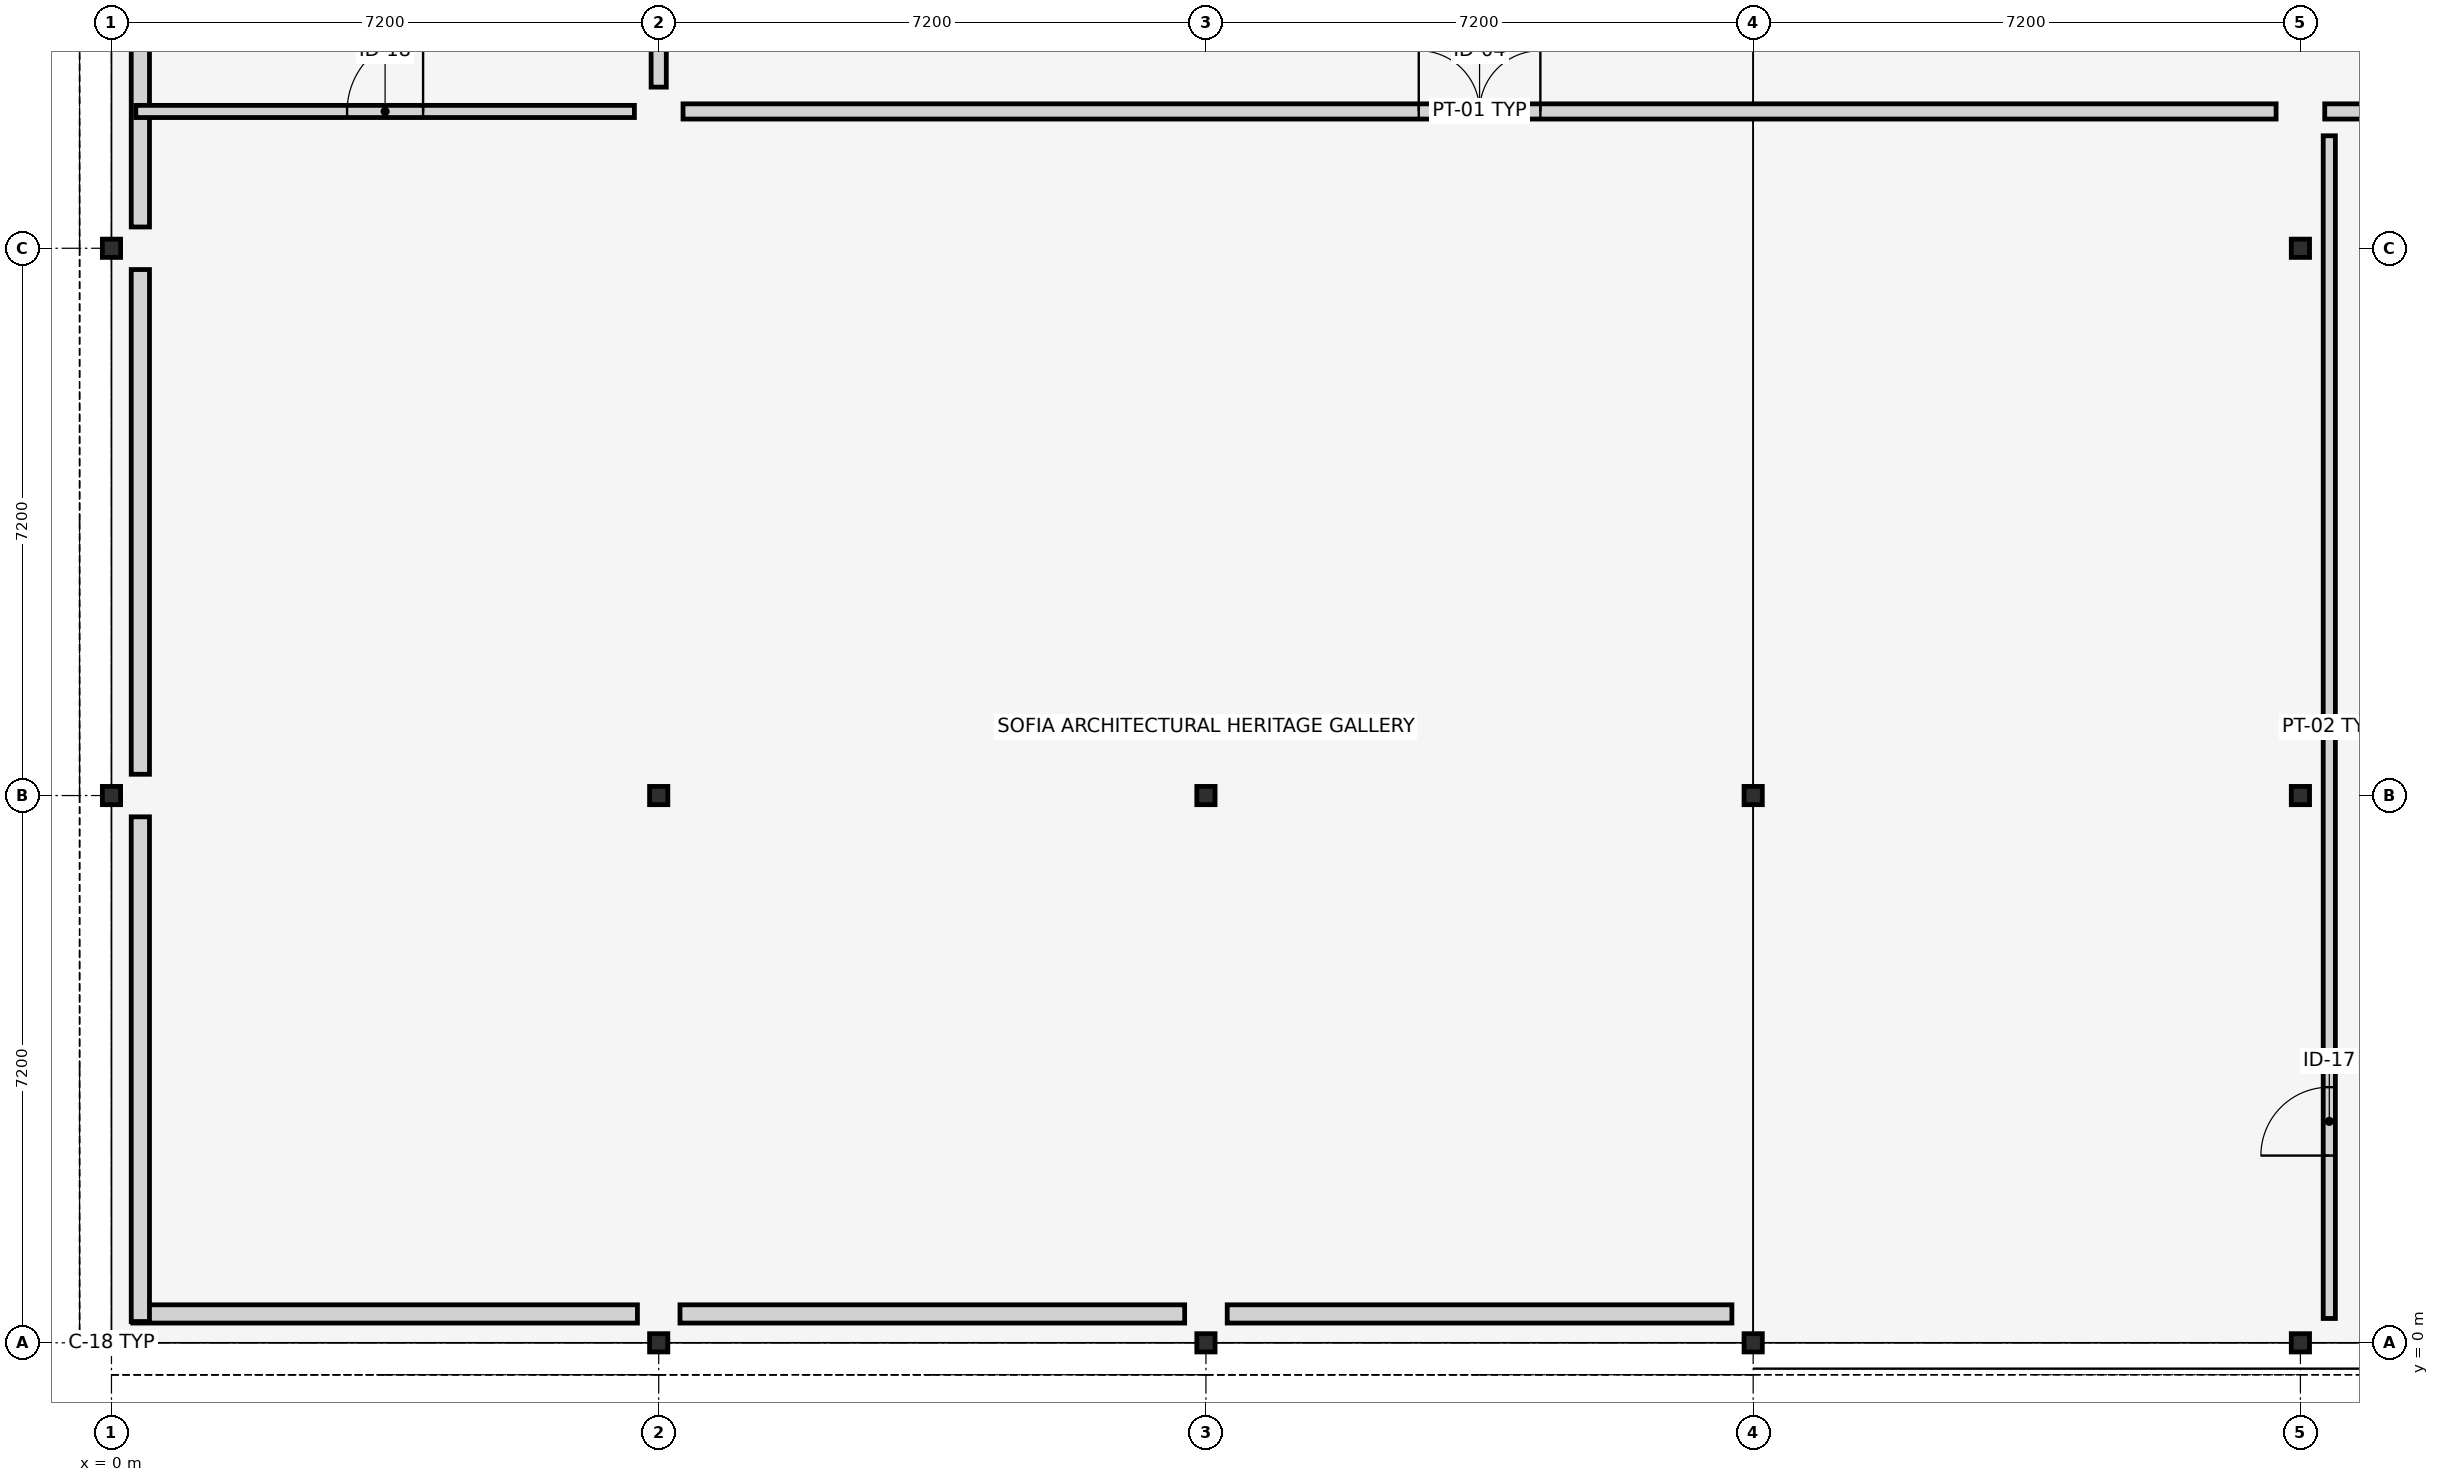
"""IFC4 building model, lengths in metres.
Left out: names, types, materials, properties, quantities, classifications, styles, units other than length and angle.
Written with IfcOpenShell. Run it as: python <this file> out.ifc"""

import sys

from ifc_helpers import new_model, si_unit, direction, frame, frame_2d, origin, origin_2d, place, context, subcontext, project, spatial, rectangle, i_section, extrude, element, fill, save


model = new_model("IFC4")
c1 = context("Model", 3, precision=1e-05, world=origin(), true_north=direction((0.0, 1.0)))
c2 = subcontext(c1, "Body", "Model", "MODEL_VIEW")
j1 = project(units=[si_unit("LENGTHUNIT", "METRE"), si_unit("PLANEANGLEUNIT", "RADIAN")], contexts=[c1])
p1 = place(None, origin())
s1 = spatial("IfcSite", under=j1, at=p1, CompositionType="ELEMENT")
p2 = place(p1, origin())
s2 = spatial("IfcBuilding", under=s1, at=p2, CompositionType="ELEMENT")
p3 = place(p2, frame((0.0, 0.0, 8.7)))
s3 = spatial("IfcBuildingStorey", under=s2, at=p3, CompositionType="ELEMENT", Elevation=8.7)
for number, where, z_axis, x_axis in (
    (1, (0.0, 0.0, 0.0), (0.0, 0.0, 1.0), (1.0, 0.0, 0.0)),
    (2, (0.0, 7.2, 0.0), (0.0, 0.0, 1.0), (0.0, 1.0, 0.0)),
    (3, (0.0, 14.4, 0.0), (0.0, 0.0, 1.0), (1.0, 0.0, 0.0)),
    (4, (7.2, 0.0, 0.0), (0.0, 0.0, 1.0), (0.0, 1.0, 0.0)),
    (5, (7.2, 7.2, 0.0), (0.0, 0.0, 1.0), (1.0, 0.0, 0.0)),
    (6, (14.4, 0.0, 0.0), (0.0, 0.0, 1.0), (1.0, 0.0, 0.0)),
    (7, (14.4, 7.2, 0.0), (0.0, 0.0, 1.0), (0.0, 1.0, 0.0)),
    (8, (21.6, 0.0, 0.0), (0.0, 0.0, 1.0), (0.0, 1.0, 0.0)),
    (9, (21.6, 7.2, 0.0), (0.0, 0.0, 1.0), (1.0, 0.0, 0.0)),
    (10, (28.8, 0.0, 0.0), (0.0, 0.0, 1.0), (1.0, 0.0, 0.0)),
    (11, (28.8, 7.2, 0.0), (0.0, 0.0, 1.0), (0.0, 1.0, 0.0)),
    (12, (28.8, 14.4, 0.0), (0.0, 0.0, 1.0), (1.0, 0.0, 0.0)),
):
    element("IfcColumn", number, at=place(p3, frame(where, z_axis=z_axis, x_axis=x_axis)), inside=s3, PredefinedType="COLUMN", context=c2, shape_type="SweptSolid", body=[
        extrude(i_section(OverallWidth=0.24, OverallDepth=0.24, WebThickness=0.01, FlangeThickness=0.017, FilletRadius=0.021, at=origin_2d()), origin(), (0.0, 0.0, 1.0), 4.2),
    ])
p4 = place(p3, frame((0.28, 0.38, 0.0), z_axis=(0.0, 0.0, 1.0), x_axis=(1.0, 0.0, 0.0)))
e13 = element("IfcWall", 13, at=p4, inside=s3, PredefinedType="STANDARD", context=c2, shape_type="SweptSolid", body=[
    extrude(rectangle(XDim=6.64, YDim=0.24, at=frame_2d((3.32, 0.0))), origin(), (0.0, 0.0, 1.0), 3.58),
])
for number, where, z_axis, x_axis in (
    (14, (7.48, 0.38, 0.0), (0.0, 0.0, 1.0), (1.0, 0.0, 0.0)),
    (15, (14.68, 0.38, 0.0), (0.0, 0.0, 1.0), (1.0, 0.0, 0.0)),
    (16, (0.38, 21.32, 0.0), (0.0, 0.0, 1.0), (0.0, -1.0, 0.0)),
    (17, (0.38, 14.12, 0.0), (0.0, 0.0, 1.0), (0.0, -1.0, 0.0)),
):
    element("IfcWall", number, at=place(p3, frame(where, z_axis=z_axis, x_axis=x_axis)), inside=s3, PredefinedType="STANDARD", context=c2, shape_type="SweptSolid", body=[
        extrude(rectangle(XDim=6.64, YDim=0.24, at=frame_2d((3.32, 0.0))), origin(), (0.0, 0.0, 1.0), 3.58),
    ])
p5 = place(p3, frame((0.38, 6.92, 0.0), z_axis=(0.0, 0.0, 1.0), x_axis=(0.0, -1.0, 0.0)))
e18 = element("IfcWall", 18, at=p5, inside=s3, PredefinedType="STANDARD", context=c2, shape_type="SweptSolid", body=[
    extrude(rectangle(XDim=6.64, YDim=0.24, at=frame_2d((3.32, 0.0))), origin(), (0.0, 0.0, 1.0), 3.58),
])
p6 = place(p3, frame((7.52, 16.2, 0.0), z_axis=(0.0, 0.0, 1.0), x_axis=(1.0, 0.0, 0.0)))
e19 = element("IfcWall", 19, at=p6, inside=s3, PredefinedType="PARTITIONING", context=c2, shape_type="SweptSolid", body=[
    extrude(rectangle(XDim=20.96, YDim=0.2, at=frame_2d((10.48, 0.0))), origin(), (0.0, 0.0, 1.0), 3.15),
])
p7 = place(p6, frame((9.68, 0.0, 0.0)))
e20 = element("IfcOpeningElement", 20, at=p7, cuts=e19, PredefinedType="OPENING", context=c2, shape_type="SweptSolid", body=[
    extrude(rectangle(XDim=1.6, YDim=2.35, at=frame_2d((0.8, 1.175))), frame((0.0, 0.11, 0.0), z_axis=(0.0, -1.0, 0.0), x_axis=(1.0, 0.0, 0.0)), (0.0, 0.0, 1.0), 0.22),
])
p8 = place(p3, frame((29.12, 16.2, 0.0), z_axis=(0.0, 0.0, 1.0), x_axis=(1.0, 0.0, 0.0)))
e21 = element("IfcWall", 21, at=p8, inside=s3, PredefinedType="PARTITIONING", context=c2, shape_type="SweptSolid", body=[
    extrude(rectangle(XDim=6.56, YDim=0.2, at=frame_2d((3.28, 0.0))), origin(), (0.0, 0.0, 1.0), 3.15),
])
p9 = place(p8, frame((2.48, 0.0, 0.0)))
e22 = element("IfcOpeningElement", 22, at=p9, cuts=e21, PredefinedType="OPENING", context=c2, shape_type="SweptSolid", body=[
    extrude(rectangle(XDim=1.6, YDim=2.35, at=frame_2d((0.8, 1.175))), frame((0.0, 0.11, 0.0), z_axis=(0.0, -1.0, 0.0), x_axis=(1.0, 0.0, 0.0)), (0.0, 0.0, 1.0), 0.22),
])
p10 = place(p3, frame((7.2, 16.52, 0.0), z_axis=(0.0, 0.0, 1.0), x_axis=(0.0, 1.0, 0.0)))
e23 = element("IfcWall", 23, at=p10, inside=s3, PredefinedType="PARTITIONING", context=c2, shape_type="SweptSolid", body=[
    extrude(rectangle(XDim=2.96, YDim=0.2, at=frame_2d((1.48, 0.0))), origin(), (0.0, 0.0, 1.0), 3.15),
])
p11 = place(p10, frame((0.98, 0.0, 0.0)))
e24 = element("IfcOpeningElement", 24, at=p11, cuts=e23, PredefinedType="OPENING", context=c2, shape_type="SweptSolid", body=[
    extrude(rectangle(XDim=1.0, YDim=2.15, at=frame_2d((0.5, 1.075))), frame((0.0, 0.11, 0.0), z_axis=(0.0, -1.0, 0.0), x_axis=(1.0, 0.0, 0.0)), (0.0, 0.0, 1.0), 0.22),
])
p12 = place(p3, frame((29.18, 0.32, 0.0), z_axis=(0.0, 0.0, 1.0), x_axis=(0.0, 1.0, 0.0)))
e25 = element("IfcWall", 25, at=p12, inside=s3, PredefinedType="PARTITIONING", context=c2, shape_type="SweptSolid", body=[
    extrude(rectangle(XDim=15.56, YDim=0.16, at=frame_2d((7.78, 0.0))), origin(), (0.0, 0.0, 1.0), 3.15),
])
p13 = place(p12, frame((2.143, 0.0, 0.0)))
e26 = element("IfcOpeningElement", 26, at=p13, cuts=e25, PredefinedType="OPENING", context=c2, shape_type="SweptSolid", body=[
    extrude(rectangle(XDim=0.9, YDim=2.1, at=frame_2d((0.45, 1.05))), frame((0.0, 0.09, 0.0), z_axis=(0.0, -1.0, 0.0), x_axis=(1.0, 0.0, 0.0)), (0.0, 0.0, 1.0), 0.18),
])
p14 = place(p3, frame((0.32, 16.2, 0.0), z_axis=(0.0, 0.0, 1.0), x_axis=(1.0, 0.0, 0.0)))
e27 = element("IfcWall", 27, at=p14, inside=s3, PredefinedType="PARTITIONING", context=c2, shape_type="SweptSolid", body=[
    extrude(rectangle(XDim=6.56, YDim=0.16, at=frame_2d((3.28, 0.0))), origin(), (0.0, 0.0, 1.0), 3.15),
])
p15 = place(p14, frame((2.78, 0.0, 0.0)))
e28 = element("IfcOpeningElement", 28, at=p15, cuts=e27, PredefinedType="OPENING", context=c2, shape_type="SweptSolid", body=[
    extrude(rectangle(XDim=1.0, YDim=2.25, at=frame_2d((0.5, 1.125))), frame((0.0, 0.09, 0.0), z_axis=(0.0, -1.0, 0.0), x_axis=(1.0, 0.0, 0.0)), (0.0, 0.0, 1.0), 0.18),
])
p16 = place(p7, origin())
e29 = element("IfcDoor", 29, at=p16, inside=s3, OperationType="DOUBLE_DOOR_SINGLE_SWING", PredefinedType="DOOR", context=c2, shape_type="SweptSolid", body=[
    extrude(rectangle(XDim=1.6, YDim=2.35, at=frame_2d((0.8, 1.175))), frame((0.0, 0.025, 0.0), z_axis=(0.0, -1.0, 0.0), x_axis=(1.0, 0.0, 0.0)), (0.0, 0.0, 1.0), 0.05),
])
fill(e20, e29)
p17 = place(p13, origin())
e30 = element("IfcDoor", 30, at=p17, inside=s3, OperationType="SINGLE_SWING_LEFT", PredefinedType="DOOR", context=c2, shape_type="SweptSolid", body=[
    extrude(rectangle(XDim=0.9, YDim=2.1, at=frame_2d((0.45, 1.05))), frame((0.0, 0.025, 0.0), z_axis=(0.0, -1.0, 0.0), x_axis=(1.0, 0.0, 0.0)), (0.0, 0.0, 1.0), 0.05),
])
fill(e26, e30)
p18 = place(p15, origin())
e31 = element("IfcDoor", 31, at=p18, inside=s3, OperationType="SINGLE_SWING_RIGHT", PredefinedType="DOOR", context=c2, shape_type="SweptSolid", body=[
    extrude(rectangle(XDim=1.0, YDim=2.25, at=frame_2d((0.5, 1.125))), frame((0.0, 0.025, 0.0), z_axis=(0.0, -1.0, 0.0), x_axis=(1.0, 0.0, 0.0)), (0.0, 0.0, 1.0), 0.05),
])
fill(e28, e31)
save(model, sys.argv[1])
